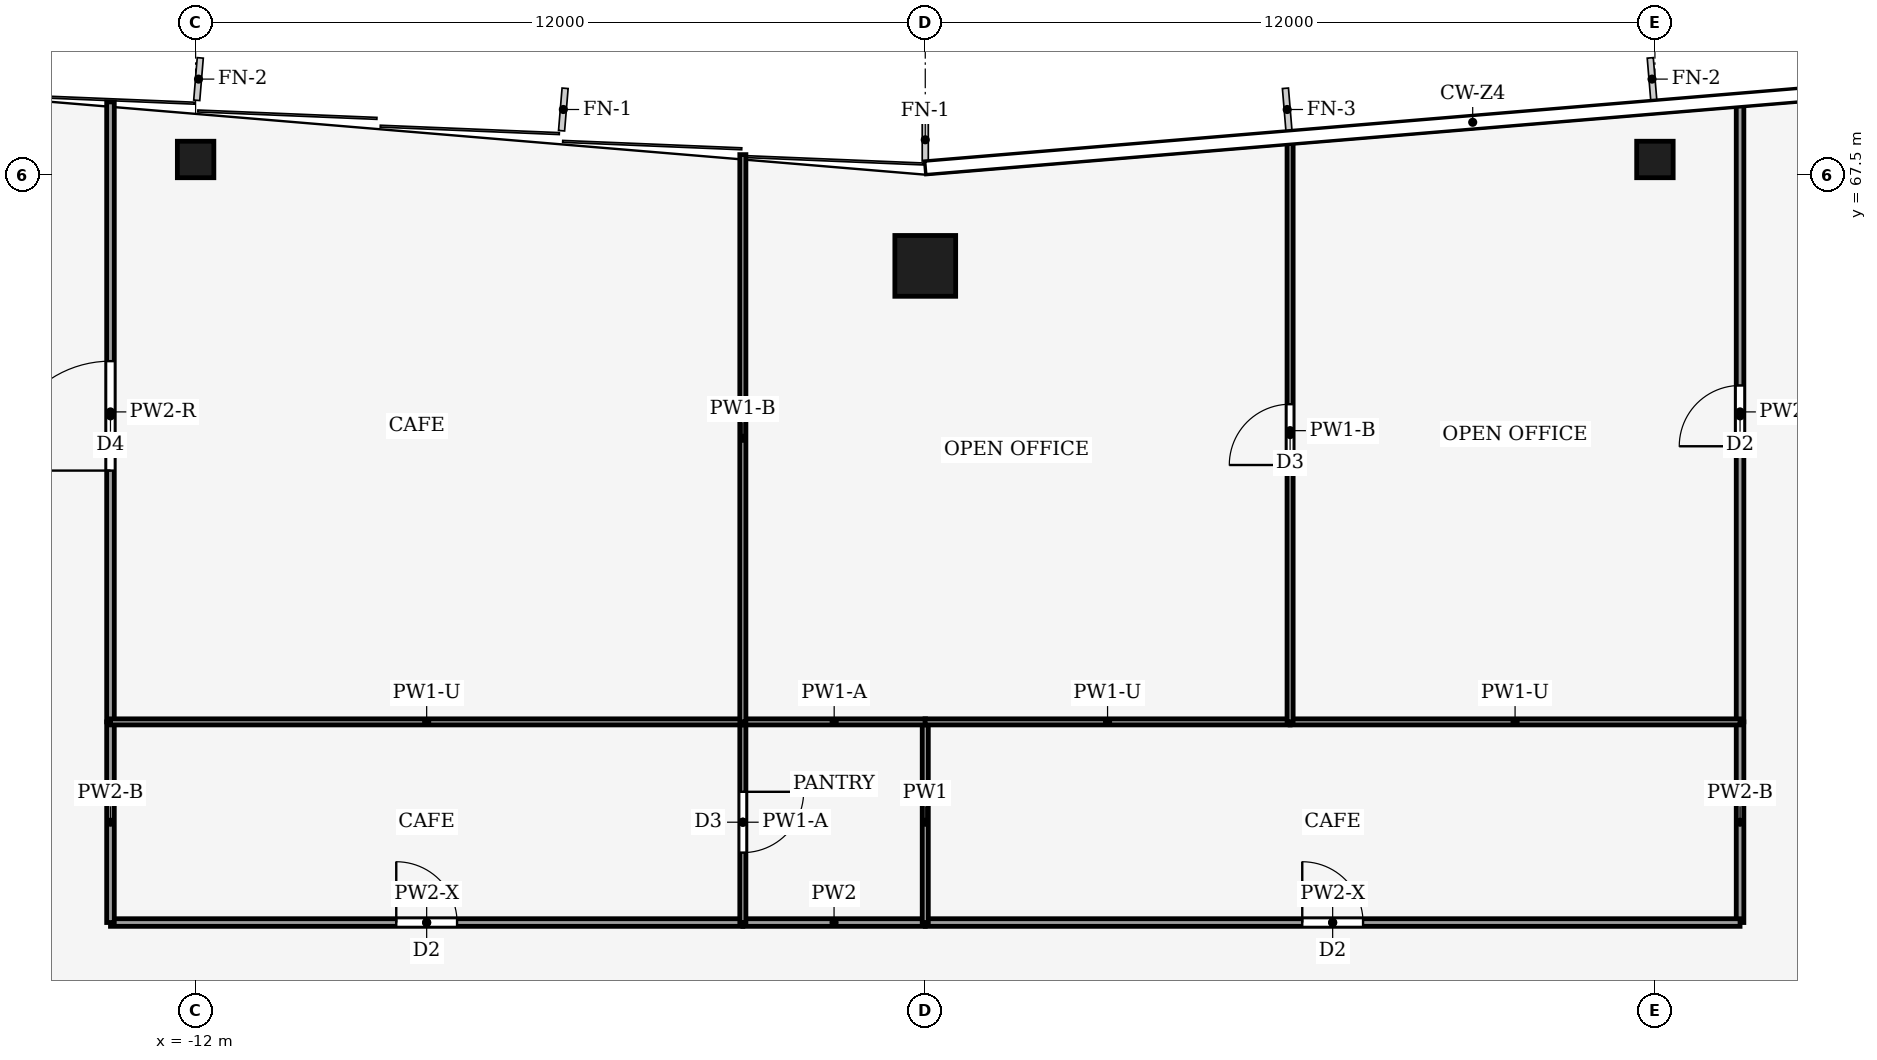
"""IFC4 building model, lengths in metres.
Left out: names, types, materials, properties, quantities, classifications, styles, units other than length and angle.
Written with IfcOpenShell. Run it as: python <this file> out.ifc"""

import sys

from ifc_helpers import new_model, si_unit, direction, frame, frame_2d, origin, origin_2d, place, context, subcontext, project, spatial, rectangle, hollow_rectangle, extrude, element, fill, save


model = new_model("IFC4")
c1 = context("Model", 3, precision=1e-05, world=origin(), true_north=direction((0.0, 1.0)))
c2 = subcontext(c1, "Body", "Model", "MODEL_VIEW")
j1 = project(units=[si_unit("LENGTHUNIT", "METRE"), si_unit("PLANEANGLEUNIT", "RADIAN")], contexts=[c1])
p1 = place(None, origin())
s1 = spatial("IfcSite", under=j1, at=p1, CompositionType="ELEMENT")
p2 = place(p1, origin())
s2 = spatial("IfcBuilding", under=s1, at=p2, CompositionType="ELEMENT")
p3 = place(p2, frame((0.0, 0.0, 233.0)))
s3 = spatial("IfcBuildingStorey", under=s2, at=p3, CompositionType="ELEMENT", Elevation=233.0)
p4 = place(p3, frame((0.0, 66.0, 0.0), z_axis=(0.0, 0.0, 1.0), x_axis=(1.0, 0.0, 0.0)))
e1 = element("IfcColumn", 1, at=p4, inside=s3, PredefinedType="COLUMN", context=c2, shape_type="SweptSolid", body=[
    extrude(hollow_rectangle(XDim=1.0, YDim=1.0, WallThickness=0.045, at=origin_2d()), origin(), (0.0, 0.0, 1.0), 5.0),
])
for number, where, z_axis, x_axis in (
    (2, (-12.0, 67.75, 0.0), (0.0, 0.0, 1.0), (1.0, 0.0, 0.0)),
    (3, (12.0, 67.75, 0.0), (0.0, 0.0, 1.0), (1.0, 0.0, 0.0)),
):
    element("IfcColumn", number, at=place(p3, frame(where, z_axis=z_axis, x_axis=x_axis)), inside=s3, PredefinedType="COLUMN", context=c2, shape_type="SweptSolid", body=[
        extrude(hollow_rectangle(XDim=0.6, YDim=0.6, WallThickness=0.025, at=origin_2d()), origin(), (0.0, 0.0, 1.0), 5.0),
    ])
p5 = place(p3, frame((-13.4, 55.2, 0.0), z_axis=(0.0, 0.0, 1.0), x_axis=(1.0, 0.0, 0.0)))
e4 = element("IfcWall", 4, at=p5, inside=s3, PredefinedType="PARTITIONING", context=c2, shape_type="SweptSolid", body=[
    extrude(rectangle(XDim=10.4, YDim=0.125, at=frame_2d((5.2, 0.0))), origin(), (0.0, 0.0, 1.0), 4.24),
])
p6 = place(p5, frame((4.7, 0.0, 0.0)))
e5 = element("IfcOpeningElement", 5, at=p6, cuts=e4, PredefinedType="OPENING", context=c2, shape_type="SweptSolid", body=[
    extrude(rectangle(XDim=1.0, YDim=2.1, at=frame_2d((0.5, 1.05))), frame((0.0, 0.073, 0.0), z_axis=(0.0, -1.0, 0.0), x_axis=(1.0, 0.0, 0.0)), (0.0, 0.0, 1.0), 0.145),
])
p7 = place(p3, frame((-13.4, 55.2, 0.0), z_axis=(0.0, 0.0, 1.0), x_axis=(0.0, 1.0, 0.0)))
e6 = element("IfcWall", 6, at=p7, inside=s3, PredefinedType="PARTITIONING", context=c2, shape_type="SweptSolid", body=[
    extrude(rectangle(XDim=3.3, YDim=0.125, at=frame_2d((1.65, 0.0))), origin(), (0.0, 0.0, 1.0), 4.87),
])
p8 = place(p3, frame((0.0, 55.2, 0.0), z_axis=(0.0, 0.0, 1.0), x_axis=(-1.0, 0.0, 0.0)))
e7 = element("IfcWall", 7, at=p8, inside=s3, PredefinedType="PARTITIONING", context=c2, shape_type="SweptSolid", body=[
    extrude(rectangle(XDim=3.0, YDim=0.125, at=frame_2d((1.5, 0.0))), origin(), (0.0, 0.0, 1.0), 4.29),
])
p9 = place(p3, frame((13.4, 55.2, 0.0), z_axis=(0.0, 0.0, 1.0), x_axis=(0.0, 1.0, 0.0)))
e8 = element("IfcWall", 8, at=p9, inside=s3, PredefinedType="PARTITIONING", context=c2, shape_type="SweptSolid", body=[
    extrude(rectangle(XDim=3.3, YDim=0.125, at=frame_2d((1.65, 0.0))), origin(), (0.0, 0.0, 1.0), 4.87),
])
p10 = place(p3, frame((0.0, 55.2, 0.0), z_axis=(0.0, 0.0, 1.0), x_axis=(1.0, 0.0, 0.0)))
e9 = element("IfcWall", 9, at=p10, inside=s3, PredefinedType="PARTITIONING", context=c2, shape_type="SweptSolid", body=[
    extrude(rectangle(XDim=13.4, YDim=0.125, at=frame_2d((6.7, 0.0))), origin(), (0.0, 0.0, 1.0), 4.24),
])
p11 = place(p10, frame((6.2, 0.0, 0.0)))
e10 = element("IfcOpeningElement", 10, at=p11, cuts=e9, PredefinedType="OPENING", context=c2, shape_type="SweptSolid", body=[
    extrude(rectangle(XDim=1.0, YDim=2.1, at=frame_2d((0.5, 1.05))), frame((0.0, 0.073, 0.0), z_axis=(0.0, -1.0, 0.0), x_axis=(1.0, 0.0, 0.0)), (0.0, 0.0, 1.0), 0.145),
])
p12 = place(p3, frame((-13.4, 58.5, 0.0), z_axis=(0.0, 0.0, 1.0), x_axis=(0.0, 1.0, 0.0)))
e11 = element("IfcWall", 11, at=p12, inside=s3, PredefinedType="PARTITIONING", context=c2, shape_type="SweptSolid", body=[
    extrude(rectangle(XDim=10.197, YDim=0.125, at=frame_2d((5.098, 0.0))), origin(), (0.0, 0.0, 1.0), 4.04),
])
p13 = place(p12, frame((4.133, 0.0, 0.0)))
e12 = element("IfcOpeningElement", 12, at=p13, cuts=e11, PredefinedType="OPENING", context=c2, shape_type="SweptSolid", body=[
    extrude(rectangle(XDim=1.8, YDim=2.1, at=frame_2d((0.9, 1.05))), frame((0.0, 0.073, 0.0), z_axis=(0.0, -1.0, 0.0), x_axis=(1.0, 0.0, 0.0)), (0.0, 0.0, 1.0), 0.145),
])
p14 = place(p3, frame((13.4, 58.5, 0.0), z_axis=(0.0, 0.0, 1.0), x_axis=(0.0, 1.0, 0.0)))
e13 = element("IfcWall", 13, at=p14, inside=s3, PredefinedType="PARTITIONING", context=c2, shape_type="SweptSolid", body=[
    extrude(rectangle(XDim=10.197, YDim=0.125, at=frame_2d((5.098, 0.0))), origin(), (0.0, 0.0, 1.0), 4.04),
])
p15 = place(p14, frame((4.533, 0.0, 0.0)))
e14 = element("IfcOpeningElement", 14, at=p15, cuts=e13, PredefinedType="OPENING", context=c2, shape_type="SweptSolid", body=[
    extrude(rectangle(XDim=1.0, YDim=2.1, at=frame_2d((0.5, 1.05))), frame((0.0, 0.073, 0.0), z_axis=(0.0, -1.0, 0.0), x_axis=(1.0, 0.0, 0.0)), (0.0, 0.0, 1.0), 0.145),
])
p16 = place(p3, frame((-3.0, 58.5, 0.0), z_axis=(0.0, 0.0, 1.0), x_axis=(0.0, -1.0, 0.0)))
e15 = element("IfcWall", 15, at=p16, inside=s3, PredefinedType="PARTITIONING", context=c2, shape_type="SweptSolid", body=[
    extrude(rectangle(XDim=3.3, YDim=0.1, at=frame_2d((1.65, 0.0))), origin(), (0.0, 0.0, 1.0), 4.87),
])
p17 = place(p16, frame((1.15, 0.0, 0.0)))
e16 = element("IfcOpeningElement", 16, at=p17, cuts=e15, PredefinedType="OPENING", context=c2, shape_type="SweptSolid", body=[
    extrude(rectangle(XDim=1.0, YDim=2.1, at=frame_2d((0.5, 1.05))), frame((0.0, 0.06, 0.0), z_axis=(0.0, -1.0, 0.0), x_axis=(1.0, 0.0, 0.0)), (0.0, 0.0, 1.0), 0.12),
])
p18 = place(p3, frame((-3.0, 58.5, 0.0), z_axis=(0.0, 0.0, 1.0), x_axis=(-1.0, 0.0, 0.0)))
e17 = element("IfcWall", 17, at=p18, inside=s3, PredefinedType="PARTITIONING", context=c2, shape_type="SweptSolid", body=[
    extrude(rectangle(XDim=10.4, YDim=0.1, at=frame_2d((5.2, 0.0))), origin(), (0.0, 0.0, 1.0), 4.24),
])
p19 = place(p3, frame((0.0, 55.2, 0.0), z_axis=(0.0, 0.0, 1.0), x_axis=(0.0, 1.0, 0.0)))
e18 = element("IfcWall", 18, at=p19, inside=s3, PredefinedType="PARTITIONING", context=c2, shape_type="SweptSolid", body=[
    extrude(rectangle(XDim=3.3, YDim=0.1, at=frame_2d((1.65, 0.0))), origin(), (0.0, 0.0, 1.0), 4.29),
])
p20 = place(p3, frame((0.004, 58.5, 0.0), z_axis=(0.0, 0.0, 1.0), x_axis=(-1.0, 0.0, 0.0)))
e19 = element("IfcWall", 19, at=p20, inside=s3, PredefinedType="PARTITIONING", context=c2, shape_type="SweptSolid", body=[
    extrude(rectangle(XDim=3.004, YDim=0.1, at=frame_2d((1.502, 0.0))), origin(), (0.0, 0.0, 1.0), 4.87),
])
p21 = place(p3, frame((6.0, 58.5, 0.0), z_axis=(0.0, 0.0, 1.0), x_axis=(-1.0, 0.0, 0.0)))
e20 = element("IfcWall", 20, at=p21, inside=s3, PredefinedType="PARTITIONING", context=c2, shape_type="SweptSolid", body=[
    extrude(rectangle(XDim=6.004, YDim=0.1, at=frame_2d((3.002, 0.0))), origin(), (0.0, 0.0, 1.0), 4.24),
])
p22 = place(p3, frame((13.4, 58.5, 0.0), z_axis=(0.0, 0.0, 1.0), x_axis=(-1.0, 0.0, 0.0)))
e21 = element("IfcWall", 21, at=p22, inside=s3, PredefinedType="PARTITIONING", context=c2, shape_type="SweptSolid", body=[
    extrude(rectangle(XDim=7.4, YDim=0.1, at=frame_2d((3.7, 0.0))), origin(), (0.0, 0.0, 1.0), 4.24),
])
p23 = place(p3, frame((-3.0, 58.5, 0.0), z_axis=(0.0, 0.0, 1.0), x_axis=(0.0, 1.0, 0.0)))
e22 = element("IfcWall", 22, at=p23, inside=s3, PredefinedType="PARTITIONING", context=c2, shape_type="SweptSolid", body=[
    extrude(rectangle(XDim=9.33, YDim=0.1, at=frame_2d((4.665, 0.0))), origin(), (0.0, 0.0, 1.0), 4.04),
])
p24 = place(p3, frame((6.0, 58.5, 0.0), z_axis=(0.0, 0.0, 1.0), x_axis=(0.0, 1.0, 0.0)))
e23 = element("IfcWall", 23, at=p24, inside=s3, PredefinedType="PARTITIONING", context=c2, shape_type="SweptSolid", body=[
    extrude(rectangle(XDim=9.58, YDim=0.1, at=frame_2d((4.79, 0.0))), origin(), (0.0, 0.0, 1.0), 4.04),
])
p25 = place(p24, frame((4.225, 0.0, 0.0)))
e24 = element("IfcOpeningElement", 24, at=p25, cuts=e23, PredefinedType="OPENING", context=c2, shape_type="SweptSolid", body=[
    extrude(rectangle(XDim=1.0, YDim=2.1, at=frame_2d((0.5, 1.05))), frame((0.0, 0.06, 0.0), z_axis=(0.0, -1.0, 0.0), x_axis=(1.0, 0.0, 0.0)), (0.0, 0.0, 1.0), 0.12),
])
p26 = place(p6, origin())
e25 = element("IfcDoor", 25, at=p26, inside=s3, OperationType="SINGLE_SWING_LEFT", PredefinedType="DOOR", context=c2, shape_type="SweptSolid", body=[
    extrude(rectangle(XDim=1.0, YDim=2.1, at=frame_2d((0.5, 1.05))), frame((0.0, 0.025, 0.0), z_axis=(0.0, -1.0, 0.0), x_axis=(1.0, 0.0, 0.0)), (0.0, 0.0, 1.0), 0.05),
])
fill(e5, e25)
p27 = place(p11, origin())
e26 = element("IfcDoor", 26, at=p27, inside=s3, OperationType="SINGLE_SWING_RIGHT", PredefinedType="DOOR", context=c2, shape_type="SweptSolid", body=[
    extrude(rectangle(XDim=1.0, YDim=2.1, at=frame_2d((0.5, 1.05))), frame((0.0, 0.025, 0.0), z_axis=(0.0, -1.0, 0.0), x_axis=(1.0, 0.0, 0.0)), (0.0, 0.0, 1.0), 0.05),
])
fill(e10, e26)
p28 = place(p13, origin())
e27 = element("IfcDoor", 27, at=p28, inside=s3, OperationType="DOUBLE_DOOR_SINGLE_SWING", PredefinedType="DOOR", context=c2, shape_type="SweptSolid", body=[
    extrude(rectangle(XDim=1.8, YDim=2.1, at=frame_2d((0.9, 1.05))), frame((0.0, 0.025, 0.0), z_axis=(0.0, -1.0, 0.0), x_axis=(1.0, 0.0, 0.0)), (0.0, 0.0, 1.0), 0.05),
])
fill(e12, e27)
p29 = place(p15, origin())
e28 = element("IfcDoor", 28, at=p29, inside=s3, OperationType="SINGLE_SWING_LEFT", PredefinedType="DOOR", context=c2, shape_type="SweptSolid", body=[
    extrude(rectangle(XDim=1.0, YDim=2.1, at=frame_2d((0.5, 1.05))), frame((0.0, 0.025, 0.0), z_axis=(0.0, -1.0, 0.0), x_axis=(1.0, 0.0, 0.0)), (0.0, 0.0, 1.0), 0.05),
])
fill(e14, e28)
p30 = place(p17, origin())
e29 = element("IfcDoor", 29, at=p30, inside=s3, OperationType="SINGLE_SWING_LEFT", PredefinedType="DOOR", context=c2, shape_type="SweptSolid", body=[
    extrude(rectangle(XDim=1.0, YDim=2.1, at=frame_2d((0.5, 1.05))), frame((0.0, 0.025, 0.0), z_axis=(0.0, -1.0, 0.0), x_axis=(1.0, 0.0, 0.0)), (0.0, 0.0, 1.0), 0.05),
])
fill(e16, e29)
p31 = place(p25, origin())
e30 = element("IfcDoor", 30, at=p31, inside=s3, OperationType="SINGLE_SWING_LEFT", PredefinedType="DOOR", context=c2, shape_type="SweptSolid", body=[
    extrude(rectangle(XDim=1.0, YDim=2.1, at=frame_2d((0.5, 1.05))), frame((0.0, 0.025, 0.0), z_axis=(0.0, -1.0, 0.0), x_axis=(1.0, 0.0, 0.0)), (0.0, 0.0, 1.0), 0.05),
])
fill(e24, e30)
save(model, sys.argv[1])
